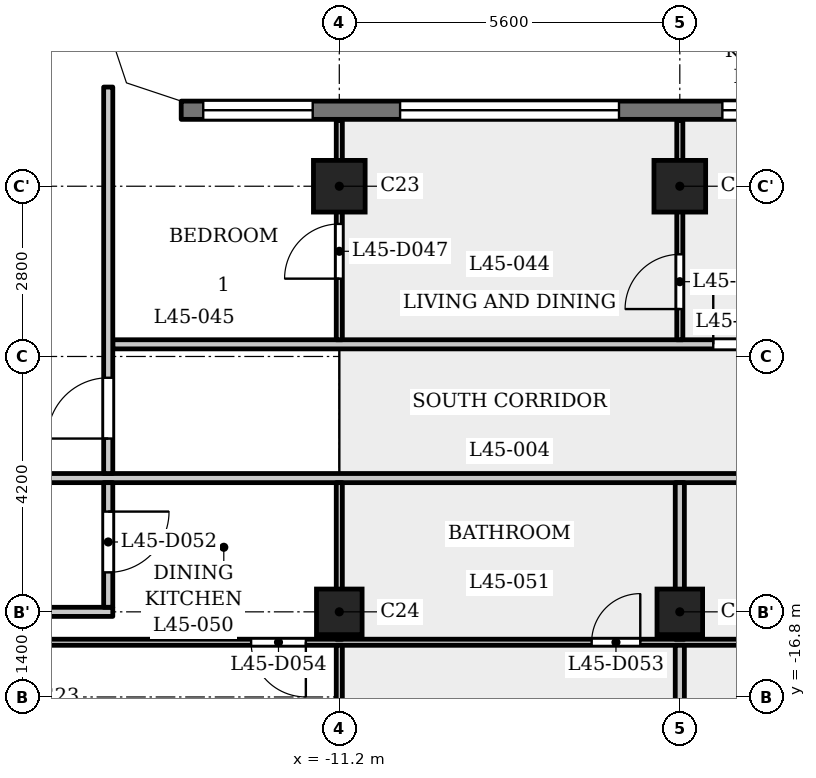
"""IFC4 building model, lengths in metres.
Left out: names, types, materials, properties, quantities, classifications, styles, units other than length and angle.
Written with IfcOpenShell. Run it as: python <this file> out.ifc"""

import sys

from ifc_helpers import new_model, si_unit, direction, frame, frame_2d, origin, origin_2d, place, context, subcontext, project, spatial, polyline, rectangle, outline, extrude, element, fill, save


model = new_model("IFC4")
c1 = context("Model", 3, precision=1e-05, world=origin(), true_north=direction((0.0, 1.0)))
c2 = subcontext(c1, "Body", "Model", "MODEL_VIEW")
j1 = project(units=[si_unit("LENGTHUNIT", "METRE"), si_unit("PLANEANGLEUNIT", "RADIAN")], contexts=[c1])
p1 = place(None, origin())
s1 = spatial("IfcSite", under=j1, at=p1, CompositionType="ELEMENT")
p2 = place(p1, origin())
s2 = spatial("IfcBuilding", under=s1, at=p2, CompositionType="ELEMENT")
p3 = place(p2, frame((0.0, 0.0, 174.6)))
s3 = spatial("IfcBuildingStorey", under=s2, at=p3, CompositionType="ELEMENT", Elevation=174.6)
for number, where, z_axis, x_axis in (
    (1, (-11.2, -8.4, 0.0), (0.0, 0.0, 1.0), (1.0, 0.0, 0.0)),
    (2, (-5.6, -8.4, 0.0), (0.0, 0.0, 1.0), (1.0, 0.0, 0.0)),
):
    element("IfcColumn", number, at=place(p3, frame(where, z_axis=z_axis, x_axis=x_axis)), inside=s3, PredefinedType="COLUMN", context=c2, shape_type="SweptSolid", body=[
        extrude(rectangle(XDim=0.85, YDim=0.85, at=origin_2d()), origin(), (0.0, 0.0, 1.0), 3.5),
    ])
for number, where, z_axis, x_axis in (
    (3, (-11.2, -15.4, 0.0), (0.0, 0.0, 1.0), (1.0, 0.0, 0.0)),
    (4, (-5.6, -15.4, 0.0), (0.0, 0.0, 1.0), (1.0, 0.0, 0.0)),
):
    element("IfcColumn", number, at=place(p3, frame(where, z_axis=z_axis, x_axis=x_axis)), inside=s3, PredefinedType="COLUMN", context=c2, shape_type="SweptSolid", body=[
        extrude(rectangle(XDim=0.75, YDim=0.75, at=origin_2d()), origin(), (0.0, 0.0, 1.0), 3.5),
    ])
p4 = place(p3, frame((13.8, -7.15, 0.0), z_axis=(0.0, 0.0, 1.0), x_axis=(-1.0, 0.0, 0.0)))
e5 = element("IfcWall", 5, at=p4, inside=s3, PredefinedType="SOLIDWALL", context=c2, shape_type="SweptSolid", body=[
    extrude(rectangle(XDim=27.6, YDim=0.3, at=frame_2d((13.8, 0.0))), origin(), (0.0, 0.0, 1.0), 3.15),
])
p5 = place(p4, frame((0.363, 0.0, 0.9)))
e6 = element("IfcOpeningElement", 6, at=p5, cuts=e5, PredefinedType="OPENING", context=c2, shape_type="SweptSolid", body=[
    extrude(rectangle(XDim=1.8, YDim=1.25, at=frame_2d((0.9, 0.625))), frame((0.0, 0.16, 0.0), z_axis=(0.0, -1.0, 0.0), x_axis=(1.0, 0.0, 0.0)), (0.0, 0.0, 1.0), 0.32),
])
p6 = place(p4, frame((3.6, 0.0, 1.2)))
e7 = element("IfcOpeningElement", 7, at=p6, cuts=e5, PredefinedType="OPENING", context=c2, shape_type="SweptSolid", body=[
    extrude(rectangle(XDim=3.6, YDim=0.95, at=frame_2d((1.8, 0.475))), frame((0.0, 0.16, 0.0), z_axis=(0.0, -1.0, 0.0), x_axis=(1.0, 0.0, 0.0)), (0.0, 0.0, 1.0), 0.32),
])
p7 = place(p4, frame((8.9, 0.0, 0.9)))
e8 = element("IfcOpeningElement", 8, at=p7, cuts=e5, PredefinedType="OPENING", context=c2, shape_type="SweptSolid", body=[
    extrude(rectangle(XDim=1.8, YDim=1.25, at=frame_2d((0.9, 0.625))), frame((0.0, 0.16, 0.0), z_axis=(0.0, -1.0, 0.0), x_axis=(1.0, 0.0, 0.0)), (0.0, 0.0, 1.0), 0.32),
])
p8 = place(p4, frame((12.0, 0.0, 0.6)))
e9 = element("IfcOpeningElement", 9, at=p8, cuts=e5, PredefinedType="OPENING", context=c2, shape_type="SweptSolid", body=[
    extrude(rectangle(XDim=1.2, YDim=1.55, at=frame_2d((0.6, 0.775))), frame((0.0, 0.16, 0.0), z_axis=(0.0, -1.0, 0.0), x_axis=(1.0, 0.0, 0.0)), (0.0, 0.0, 1.0), 0.32),
])
p9 = place(p4, frame((14.4, 0.0, 0.6)))
e10 = element("IfcOpeningElement", 10, at=p9, cuts=e5, PredefinedType="OPENING", context=c2, shape_type="SweptSolid", body=[
    extrude(rectangle(XDim=1.2, YDim=1.55, at=frame_2d((0.6, 0.775))), frame((0.0, 0.16, 0.0), z_axis=(0.0, -1.0, 0.0), x_axis=(1.0, 0.0, 0.0)), (0.0, 0.0, 1.0), 0.32),
])
p10 = place(p4, frame((16.9, 0.0, 0.9)))
e11 = element("IfcOpeningElement", 11, at=p10, cuts=e5, PredefinedType="OPENING", context=c2, shape_type="SweptSolid", body=[
    extrude(rectangle(XDim=1.8, YDim=1.25, at=frame_2d((0.9, 0.625))), frame((0.0, 0.16, 0.0), z_axis=(0.0, -1.0, 0.0), x_axis=(1.0, 0.0, 0.0)), (0.0, 0.0, 1.0), 0.32),
])
p11 = place(p4, frame((20.4, 0.0, 1.2)))
e12 = element("IfcOpeningElement", 12, at=p11, cuts=e5, PredefinedType="OPENING", context=c2, shape_type="SweptSolid", body=[
    extrude(rectangle(XDim=3.6, YDim=0.95, at=frame_2d((1.8, 0.475))), frame((0.0, 0.16, 0.0), z_axis=(0.0, -1.0, 0.0), x_axis=(1.0, 0.0, 0.0)), (0.0, 0.0, 1.0), 0.32),
])
p12 = place(p4, frame((25.438, 0.0, 0.9)))
e13 = element("IfcOpeningElement", 13, at=p12, cuts=e5, PredefinedType="OPENING", context=c2, shape_type="SweptSolid", body=[
    extrude(rectangle(XDim=1.8, YDim=1.25, at=frame_2d((0.9, 0.625))), frame((0.0, 0.16, 0.0), z_axis=(0.0, -1.0, 0.0), x_axis=(1.0, 0.0, 0.0)), (0.0, 0.0, 1.0), 0.32),
])
p13 = place(p3, frame((-16.725, -15.9, 0.0), z_axis=(0.0, 0.0, 1.0), x_axis=(1.0, 0.0, 0.0)))
e14 = element("IfcWall", 14, at=p13, inside=s3, PredefinedType="PARTITIONING", context=c2, shape_type="SweptSolid", body=[
    extrude(rectangle(XDim=33.45, YDim=0.1, at=frame_2d((16.725, 0.0))), origin(), (0.0, 0.0, 1.0), 3.15),
])
p14 = place(p13, frame((9.675, 0.0, 0.0)))
e15 = element("IfcOpeningElement", 15, at=p14, cuts=e14, PredefinedType="OPENING", context=c2, shape_type="SweptSolid", body=[
    extrude(rectangle(XDim=0.8, YDim=2.1, at=frame_2d((0.4, 1.05))), frame((0.0, 0.06, 0.0), z_axis=(0.0, -1.0, 0.0), x_axis=(1.0, 0.0, 0.0)), (0.0, 0.0, 1.0), 0.12),
])
p15 = place(p13, frame((4.075, 0.0, 0.0)))
e16 = element("IfcOpeningElement", 16, at=p15, cuts=e14, PredefinedType="OPENING", context=c2, shape_type="SweptSolid", body=[
    extrude(rectangle(XDim=0.9, YDim=2.1, at=frame_2d((0.45, 1.05))), frame((0.0, 0.06, 0.0), z_axis=(0.0, -1.0, 0.0), x_axis=(1.0, 0.0, 0.0)), (0.0, 0.0, 1.0), 0.12),
])
p16 = place(p13, frame((20.875, 0.0, 0.0)))
e17 = element("IfcOpeningElement", 17, at=p16, cuts=e14, PredefinedType="OPENING", context=c2, shape_type="SweptSolid", body=[
    extrude(rectangle(XDim=0.8, YDim=2.1, at=frame_2d((0.4, 1.05))), frame((0.0, 0.06, 0.0), z_axis=(0.0, -1.0, 0.0), x_axis=(1.0, 0.0, 0.0)), (0.0, 0.0, 1.0), 0.12),
])
p17 = place(p13, frame((15.275, 0.0, 0.0)))
e18 = element("IfcOpeningElement", 18, at=p17, cuts=e14, PredefinedType="OPENING", context=c2, shape_type="SweptSolid", body=[
    extrude(rectangle(XDim=0.9, YDim=2.1, at=frame_2d((0.45, 1.05))), frame((0.0, 0.06, 0.0), z_axis=(0.0, -1.0, 0.0), x_axis=(1.0, 0.0, 0.0)), (0.0, 0.0, 1.0), 0.12),
])
p18 = place(p13, frame((30.825, 0.0, 0.0)))
e19 = element("IfcOpeningElement", 19, at=p18, cuts=e14, PredefinedType="OPENING", context=c2, shape_type="SweptSolid", body=[
    extrude(rectangle(XDim=0.8, YDim=2.1, at=frame_2d((0.4, 1.05))), frame((0.0, 0.06, 0.0), z_axis=(0.0, -1.0, 0.0), x_axis=(1.0, 0.0, 0.0)), (0.0, 0.0, 1.0), 0.12),
])
p19 = place(p13, frame((26.475, 0.0, 0.0)))
e20 = element("IfcOpeningElement", 20, at=p19, cuts=e14, PredefinedType="OPENING", context=c2, shape_type="SweptSolid", body=[
    extrude(rectangle(XDim=0.9, YDim=2.1, at=frame_2d((0.45, 1.05))), frame((0.0, 0.06, 0.0), z_axis=(0.0, -1.0, 0.0), x_axis=(1.0, 0.0, 0.0)), (0.0, 0.0, 1.0), 0.12),
])
p20 = place(p3, frame((-27.484, -15.4, 0.0), z_axis=(0.0, 0.0, 1.0), x_axis=(1.0, 0.0, 0.0)))
e21 = element("IfcWall", 21, at=p20, inside=s3, PredefinedType="PARTITIONING", context=c2, shape_type="SweptSolid", body=[
    extrude(rectangle(XDim=12.559, YDim=0.15, at=frame_2d((6.279, 0.0))), origin(), (0.0, 0.0, 1.0), 3.15),
])
p21 = place(p20, frame((8.984, 0.0, 0.0)))
e22 = element("IfcOpeningElement", 22, at=p21, cuts=e21, PredefinedType="OPENING", context=c2, shape_type="SweptSolid", body=[
    extrude(rectangle(XDim=1.0, YDim=2.1, at=frame_2d((0.5, 1.05))), frame((0.0, 0.085, 0.0), z_axis=(0.0, -1.0, 0.0), x_axis=(1.0, 0.0, 0.0)), (0.0, 0.0, 1.0), 0.17),
])
p22 = place(p3, frame((-17.4, -13.2, 0.0), z_axis=(0.0, 0.0, 1.0), x_axis=(1.0, 0.0, 0.0)))
e23 = element("IfcWall", 23, at=p22, inside=s3, PredefinedType="PARTITIONING", context=c2, shape_type="SweptSolid", body=[
    extrude(rectangle(XDim=34.8, YDim=0.15, at=frame_2d((17.4, 0.0))), origin(), (0.0, 0.0, 1.0), 3.15),
])
p23 = place(p22, frame((0.15, 0.0, 0.0)))
e24 = element("IfcOpeningElement", 24, at=p23, cuts=e23, PredefinedType="OPENING", context=c2, shape_type="SweptSolid", body=[
    extrude(rectangle(XDim=1.0, YDim=2.1, at=frame_2d((0.5, 1.05))), frame((0.0, 0.085, 0.0), z_axis=(0.0, -1.0, 0.0), x_axis=(1.0, 0.0, 0.0)), (0.0, 0.0, 1.0), 0.17),
])
p24 = place(p22, frame((33.55, 0.0, 0.0)))
e25 = element("IfcOpeningElement", 25, at=p24, cuts=e23, PredefinedType="OPENING", context=c2, shape_type="SweptSolid", body=[
    extrude(rectangle(XDim=1.0, YDim=2.1, at=frame_2d((0.5, 1.05))), frame((0.0, 0.085, 0.0), z_axis=(0.0, -1.0, 0.0), x_axis=(1.0, 0.0, 0.0)), (0.0, 0.0, 1.0), 0.17),
])
p25 = place(p22, frame((15.7, 0.0, 0.0)))
e26 = element("IfcOpeningElement", 26, at=p25, cuts=e23, PredefinedType="OPENING", context=c2, shape_type="SweptSolid", body=[
    extrude(rectangle(XDim=1.0, YDim=2.1, at=frame_2d((0.5, 1.05))), frame((0.0, 0.085, 0.0), z_axis=(0.0, -1.0, 0.0), x_axis=(1.0, 0.0, 0.0)), (0.0, 0.0, 1.0), 0.17),
])
p26 = place(p22, frame((26.9, 0.0, 0.0)))
e27 = element("IfcOpeningElement", 27, at=p26, cuts=e23, PredefinedType="OPENING", context=c2, shape_type="SweptSolid", body=[
    extrude(rectangle(XDim=1.0, YDim=2.1, at=frame_2d((0.5, 1.05))), frame((0.0, 0.085, 0.0), z_axis=(0.0, -1.0, 0.0), x_axis=(1.0, 0.0, 0.0)), (0.0, 0.0, 1.0), 0.17),
])
p27 = place(p3, frame((-14.925, -11.0, 0.0), z_axis=(0.0, 0.0, 1.0), x_axis=(1.0, 0.0, 0.0)))
e28 = element("IfcWall", 28, at=p27, inside=s3, PredefinedType="PARTITIONING", context=c2, shape_type="SweptSolid", body=[
    extrude(rectangle(XDim=29.85, YDim=0.15, at=frame_2d((14.925, 0.0))), origin(), (0.0, 0.0, 1.0), 3.15),
])
p28 = place(p27, frame((9.875, 0.0, 0.0)))
e29 = element("IfcOpeningElement", 29, at=p28, cuts=e28, PredefinedType="OPENING", context=c2, shape_type="SweptSolid", body=[
    extrude(rectangle(XDim=1.0, YDim=2.1, at=frame_2d((0.5, 1.05))), frame((0.0, 0.085, 0.0), z_axis=(0.0, -1.0, 0.0), x_axis=(1.0, 0.0, 0.0)), (0.0, 0.0, 1.0), 0.17),
])
p29 = place(p27, frame((17.875, 0.0, 0.0)))
e30 = element("IfcOpeningElement", 30, at=p29, cuts=e28, PredefinedType="OPENING", context=c2, shape_type="SweptSolid", body=[
    extrude(rectangle(XDim=1.0, YDim=2.1, at=frame_2d((0.5, 1.05))), frame((0.0, 0.085, 0.0), z_axis=(0.0, -1.0, 0.0), x_axis=(1.0, 0.0, 0.0)), (0.0, 0.0, 1.0), 0.17),
])
p30 = place(p3, frame((-15.0, -15.325, 0.0), z_axis=(0.0, 0.0, 1.0), x_axis=(0.0, 1.0, 0.0)))
e31 = element("IfcWall", 31, at=p30, inside=s3, PredefinedType="PARTITIONING", context=c2, shape_type="SweptSolid", body=[
    extrude(rectangle(XDim=2.05, YDim=0.15, at=frame_2d((1.025, 0.0))), origin(), (0.0, 0.0, 1.0), 3.15),
])
p31 = place(p30, frame((0.574, 0.0, 0.0)))
e32 = element("IfcOpeningElement", 32, at=p31, cuts=e31, PredefinedType="OPENING", context=c2, shape_type="SweptSolid", body=[
    extrude(rectangle(XDim=1.0, YDim=2.1, at=frame_2d((0.5, 1.05))), frame((0.0, 0.085, 0.0), z_axis=(0.0, -1.0, 0.0), x_axis=(1.0, 0.0, 0.0)), (0.0, 0.0, 1.0), 0.17),
])
p32 = place(p3, frame((-15.0, -13.125, 0.0), z_axis=(0.0, 0.0, 1.0), x_axis=(0.0, 1.0, 0.0)))
e33 = element("IfcWall", 33, at=p32, inside=s3, PredefinedType="PARTITIONING", context=c2, shape_type="SweptSolid", body=[
    extrude(rectangle(XDim=6.356, YDim=0.15, at=frame_2d((3.178, 0.0))), origin(), (0.0, 0.0, 1.0), 3.15),
])
p33 = place(p32, frame((0.575, 0.0, 0.0)))
e34 = element("IfcOpeningElement", 34, at=p33, cuts=e33, PredefinedType="OPENING", context=c2, shape_type="SweptSolid", body=[
    extrude(rectangle(XDim=1.0, YDim=2.1, at=frame_2d((0.5, 1.05))), frame((0.0, 0.085, 0.0), z_axis=(0.0, -1.0, 0.0), x_axis=(1.0, 0.0, 0.0)), (0.0, 0.0, 1.0), 0.17),
])
p34 = place(p3, frame((-11.2, -22.88, 0.0), z_axis=(0.0, 0.0, 1.0), x_axis=(0.0, 1.0, 0.0)))
e35 = element("IfcWall", 35, at=p34, inside=s3, PredefinedType="PARTITIONING", context=c2, shape_type="SweptSolid", body=[
    extrude(rectangle(XDim=6.93, YDim=0.1, at=frame_2d((3.465, 0.0))), origin(), (0.0, 0.0, 1.0), 3.15),
])
p35 = place(p34, frame((1.22, 0.0, 0.0)))
e36 = element("IfcOpeningElement", 36, at=p35, cuts=e35, PredefinedType="OPENING", context=c2, shape_type="SweptSolid", body=[
    extrude(rectangle(XDim=0.9, YDim=2.1, at=frame_2d((0.45, 1.05))), frame((0.0, 0.06, 0.0), z_axis=(0.0, -1.0, 0.0), x_axis=(1.0, 0.0, 0.0)), (0.0, 0.0, 1.0), 0.12),
])
p36 = place(p3, frame((-11.2, -15.85, 0.0), z_axis=(0.0, 0.0, 1.0), x_axis=(0.0, 1.0, 0.0)))
e37 = element("IfcWall", 37, at=p36, inside=s3, PredefinedType="PARTITIONING", context=c2, shape_type="SweptSolid", body=[
    extrude(rectangle(XDim=2.575, YDim=0.1, at=frame_2d((1.288, 0.0))), origin(), (0.0, 0.0, 1.0), 3.15),
])
p37 = place(p3, frame((-11.2, -10.925, 0.0), z_axis=(0.0, 0.0, 1.0), x_axis=(0.0, 1.0, 0.0)))
e38 = element("IfcWall", 38, at=p37, inside=s3, PredefinedType="PARTITIONING", context=c2, shape_type="SweptSolid", body=[
    extrude(rectangle(XDim=3.605, YDim=0.1, at=frame_2d((1.802, 0.0))), origin(), (0.0, 0.0, 1.0), 3.15),
])
p38 = place(p37, frame((1.005, 0.0, 0.0)))
e39 = element("IfcOpeningElement", 39, at=p38, cuts=e38, PredefinedType="OPENING", context=c2, shape_type="SweptSolid", body=[
    extrude(rectangle(XDim=0.9, YDim=2.1, at=frame_2d((0.45, 1.05))), frame((0.0, 0.06, 0.0), z_axis=(0.0, -1.0, 0.0), x_axis=(1.0, 0.0, 0.0)), (0.0, 0.0, 1.0), 0.12),
])
p39 = place(p3, frame((-5.6, -10.925, 0.0), z_axis=(0.0, 0.0, 1.0), x_axis=(0.0, 1.0, 0.0)))
e40 = element("IfcWall", 40, at=p39, inside=s3, PredefinedType="PARTITIONING", context=c2, shape_type="SweptSolid", body=[
    extrude(rectangle(XDim=3.605, YDim=0.1, at=frame_2d((1.802, 0.0))), origin(), (0.0, 0.0, 1.0), 3.15),
])
p40 = place(p39, frame((0.505, 0.0, 0.0)))
e41 = element("IfcOpeningElement", 41, at=p40, cuts=e40, PredefinedType="OPENING", context=c2, shape_type="SweptSolid", body=[
    extrude(rectangle(XDim=0.9, YDim=2.1, at=frame_2d((0.45, 1.05))), frame((0.0, 0.06, 0.0), z_axis=(0.0, -1.0, 0.0), x_axis=(1.0, 0.0, 0.0)), (0.0, 0.0, 1.0), 0.12),
])
p41 = place(p3, frame((-5.6, -22.88, 0.0), z_axis=(0.0, 0.0, 1.0), x_axis=(0.0, 1.0, 0.0)))
e42 = element("IfcWall", 42, at=p41, inside=s3, PredefinedType="PARTITIONING", context=c2, shape_type="SweptSolid", body=[
    extrude(rectangle(XDim=6.93, YDim=0.15, at=frame_2d((3.465, 0.0))), origin(), (0.0, 0.0, 1.0), 3.15),
])
p42 = place(p3, frame((-5.6, -15.85, 0.0), z_axis=(0.0, 0.0, 1.0), x_axis=(0.0, 1.0, 0.0)))
e43 = element("IfcWall", 43, at=p42, inside=s3, PredefinedType="PARTITIONING", context=c2, shape_type="SweptSolid", body=[
    extrude(rectangle(XDim=2.575, YDim=0.15, at=frame_2d((1.288, 0.0))), origin(), (0.0, 0.0, 1.0), 3.15),
])
p43 = place(p3, origin())
e44 = element("IfcWall", 44, at=p43, inside=s3, PredefinedType="SOLIDWALL", context=c2, shape_type="SweptSolid", body=[
    extrude(outline(polyline([(-14.937, -6.937), (-13.849, -7.3), (-13.8, -7.3), (-13.8, -7.0), (-14.7, -6.7), (-15.0, -5.8), (-15.3, -5.8), (-15.3, -5.849), (-14.937, -6.937)])), origin(), (0.0, 0.0, 1.0), 3.15),
])
p44 = place(p33, origin())
e45 = element("IfcDoor", 45, at=p44, inside=s3, OperationType="SINGLE_SWING_RIGHT", PredefinedType="DOOR", context=c2, shape_type="SweptSolid", body=[
    extrude(rectangle(XDim=1.0, YDim=2.1, at=frame_2d((0.5, 1.05))), frame((0.0, 0.025, 0.0), z_axis=(0.0, -1.0, 0.0), x_axis=(1.0, 0.0, 0.0)), (0.0, 0.0, 1.0), 0.05),
])
fill(e34, e45)
p45 = place(p28, origin())
e46 = element("IfcDoor", 46, at=p45, inside=s3, OperationType="SINGLE_SWING_RIGHT", PredefinedType="DOOR", context=c2, shape_type="SweptSolid", body=[
    extrude(rectangle(XDim=1.0, YDim=2.1, at=frame_2d((0.5, 1.05))), frame((0.0, 0.025, 0.0), z_axis=(0.0, -1.0, 0.0), x_axis=(1.0, 0.0, 0.0)), (0.0, 0.0, 1.0), 0.05),
])
fill(e29, e46)
p46 = place(p40, origin())
e47 = element("IfcDoor", 47, at=p46, inside=s3, OperationType="SINGLE_SWING_RIGHT", PredefinedType="DOOR", context=c2, shape_type="SweptSolid", body=[
    extrude(rectangle(XDim=0.9, YDim=2.1, at=frame_2d((0.45, 1.05))), frame((0.0, 0.025, 0.0), z_axis=(0.0, -1.0, 0.0), x_axis=(1.0, 0.0, 0.0)), (0.0, 0.0, 1.0), 0.05),
])
fill(e41, e47)
p47 = place(p38, origin())
e48 = element("IfcDoor", 48, at=p47, inside=s3, OperationType="SINGLE_SWING_RIGHT", PredefinedType="DOOR", context=c2, shape_type="SweptSolid", body=[
    extrude(rectangle(XDim=0.9, YDim=2.1, at=frame_2d((0.45, 1.05))), frame((0.0, 0.025, 0.0), z_axis=(0.0, -1.0, 0.0), x_axis=(1.0, 0.0, 0.0)), (0.0, 0.0, 1.0), 0.05),
])
fill(e39, e48)
p48 = place(p31, origin())
e49 = element("IfcDoor", 49, at=p48, inside=s3, OperationType="SINGLE_SWING_RIGHT", PredefinedType="DOOR", context=c2, shape_type="SweptSolid", body=[
    extrude(rectangle(XDim=1.0, YDim=2.1, at=frame_2d((0.5, 1.05))), frame((0.0, 0.025, 0.0), z_axis=(0.0, -1.0, 0.0), x_axis=(1.0, 0.0, 0.0)), (0.0, 0.0, 1.0), 0.05),
])
fill(e32, e49)
p49 = place(p14, origin())
e50 = element("IfcDoor", 50, at=p49, inside=s3, OperationType="SINGLE_SWING_LEFT", PredefinedType="DOOR", context=c2, shape_type="SweptSolid", body=[
    extrude(rectangle(XDim=0.8, YDim=2.1, at=frame_2d((0.4, 1.05))), frame((0.0, 0.025, 0.0), z_axis=(0.0, -1.0, 0.0), x_axis=(1.0, 0.0, 0.0)), (0.0, 0.0, 1.0), 0.05),
])
fill(e15, e50)
p50 = place(p15, origin())
e51 = element("IfcDoor", 51, at=p50, inside=s3, OperationType="SINGLE_SWING_RIGHT", PredefinedType="DOOR", context=c2, shape_type="SweptSolid", body=[
    extrude(rectangle(XDim=0.9, YDim=2.1, at=frame_2d((0.45, 1.05))), frame((0.0, 0.025, 0.0), z_axis=(0.0, -1.0, 0.0), x_axis=(1.0, 0.0, 0.0)), (0.0, 0.0, 1.0), 0.05),
])
fill(e16, e51)
p51 = place(p10, origin())
e52 = element("IfcWindow", 52, at=p51, inside=s3, PartitioningType="SINGLE_PANEL", PredefinedType="WINDOW", context=c2, shape_type="SweptSolid", body=[
    extrude(rectangle(XDim=1.8, YDim=1.25, at=frame_2d((0.9, 0.625))), frame((0.0, 0.03, 0.0), z_axis=(0.0, -1.0, 0.0), x_axis=(1.0, 0.0, 0.0)), (0.0, 0.0, 1.0), 0.06),
])
fill(e11, e52)
p52 = place(p11, origin())
e53 = element("IfcWindow", 53, at=p52, inside=s3, PartitioningType="SINGLE_PANEL", PredefinedType="WINDOW", context=c2, shape_type="SweptSolid", body=[
    extrude(rectangle(XDim=3.6, YDim=0.95, at=frame_2d((1.8, 0.475))), frame((0.0, 0.03, 0.0), z_axis=(0.0, -1.0, 0.0), x_axis=(1.0, 0.0, 0.0)), (0.0, 0.0, 1.0), 0.06),
])
fill(e12, e53)
p53 = place(p12, origin())
e54 = element("IfcWindow", 54, at=p53, inside=s3, PartitioningType="SINGLE_PANEL", PredefinedType="WINDOW", context=c2, shape_type="SweptSolid", body=[
    extrude(rectangle(XDim=1.8, YDim=1.25, at=frame_2d((0.9, 0.625))), frame((0.0, 0.03, 0.0), z_axis=(0.0, -1.0, 0.0), x_axis=(1.0, 0.0, 0.0)), (0.0, 0.0, 1.0), 0.06),
])
fill(e13, e54)
save(model, sys.argv[1])
